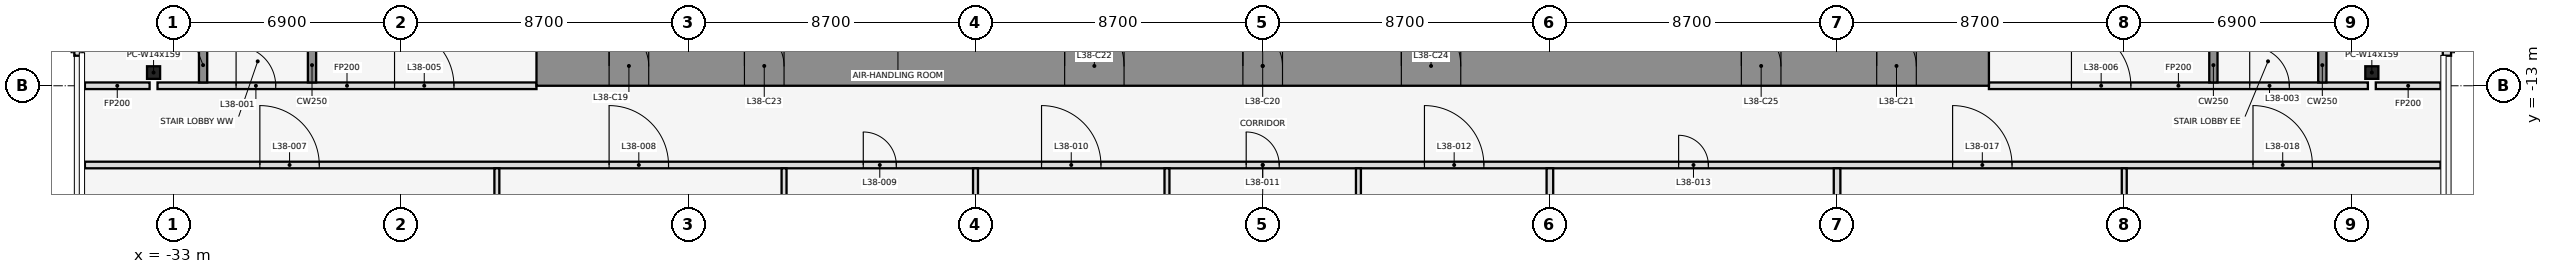
"""IFC4 building model, lengths in metres.
Left out: names, types, materials, properties, quantities, classifications, styles, units other than length and angle.
Written with IfcOpenShell. Run it as: python <this file> out.ifc"""

import sys

from ifc_helpers import new_model, si_unit, direction, frame, frame_2d, origin, origin_2d, place, context, subcontext, project, spatial, rectangle, i_section, extrude, element, fill, save


model = new_model("IFC4")
c1 = context("Model", 3, precision=1e-05, world=origin(), true_north=direction((0.0, 1.0)))
c2 = subcontext(c1, "Body", "Model", "MODEL_VIEW")
j1 = project(units=[si_unit("LENGTHUNIT", "METRE"), si_unit("PLANEANGLEUNIT", "RADIAN")], contexts=[c1])
p1 = place(None, origin())
s1 = spatial("IfcSite", under=j1, at=p1, CompositionType="ELEMENT")
p2 = place(p1, origin())
s2 = spatial("IfcBuilding", under=s1, at=p2, CompositionType="ELEMENT")
p3 = place(p2, frame((0.0, 0.0, 173.2)))
s3 = spatial("IfcBuildingStorey", under=s2, at=p3, CompositionType="ELEMENT", Elevation=173.2)
for number, where, z_axis, x_axis in (
    (1, (-33.6, -12.6, 0.0), (0.0, 0.0, 1.0), (1.0, 0.0, 0.0)),
    (2, (33.6, -12.6, 0.0), (0.0, 0.0, 1.0), (1.0, 0.0, 0.0)),
):
    element("IfcColumn", number, at=place(p3, frame(where, z_axis=z_axis, x_axis=x_axis)), inside=s3, PredefinedType="COLUMN", context=c2, shape_type="SweptSolid", body=[
        extrude(i_section(OverallWidth=0.396, OverallDepth=0.381, WebThickness=0.019, FlangeThickness=0.03, at=origin_2d()), origin(), (0.0, 0.0, 1.0), 4.1),
    ])
for number, where, z_axis, x_axis in (
    (3, (-35.875, -3.0, 0.0), (0.0, 0.0, 1.0), (0.0, -1.0, 0.0)),
    (4, (35.875, -12.09, 0.0), (0.0, 0.0, 1.0), (0.0, 1.0, 0.0)),
):
    element("IfcWall", number, at=place(p3, frame(where, z_axis=z_axis, x_axis=x_axis)), inside=s3, PredefinedType="STANDARD", context=c2, shape_type="SweptSolid", body=[
        extrude(rectangle(XDim=9.09, YDim=0.25, at=frame_2d((4.545, 0.0))), origin(), (0.0, 0.0, 1.0), 3.95),
    ])
p4 = place(p3, frame((-35.68, -15.4, 0.0), z_axis=(0.0, 0.0, 1.0), x_axis=(1.0, 0.0, 0.0)))
e5 = element("IfcWall", 5, at=p4, inside=s3, PredefinedType="PARTITIONING", context=c2, shape_type="SweptSolid", body=[
    extrude(rectangle(XDim=71.36, YDim=0.2, at=frame_2d((35.68, 0.0))), origin(), (0.0, 0.0, 1.0), 2.84),
])
p5 = place(p4, frame((5.3, 0.0, 0.0)))
e6 = element("IfcOpeningElement", 6, at=p5, cuts=e5, PredefinedType="OPENING", context=c2, shape_type="SweptSolid", body=[
    extrude(rectangle(XDim=1.8, YDim=2.1, at=frame_2d((0.9, 1.05))), frame((0.0, 0.112, 0.0), z_axis=(0.0, -1.0, 0.0), x_axis=(1.0, 0.0, 0.0)), (0.0, 0.0, 1.0), 0.224),
])
p6 = place(p4, frame((15.88, 0.0, 0.0)))
e7 = element("IfcOpeningElement", 7, at=p6, cuts=e5, PredefinedType="OPENING", context=c2, shape_type="SweptSolid", body=[
    extrude(rectangle(XDim=1.8, YDim=2.1, at=frame_2d((0.9, 1.05))), frame((0.0, 0.112, 0.0), z_axis=(0.0, -1.0, 0.0), x_axis=(1.0, 0.0, 0.0)), (0.0, 0.0, 1.0), 0.224),
])
p7 = place(p4, frame((23.58, 0.0, 0.0)))
e8 = element("IfcOpeningElement", 8, at=p7, cuts=e5, PredefinedType="OPENING", context=c2, shape_type="SweptSolid", body=[
    extrude(rectangle(XDim=1.0, YDim=2.1, at=frame_2d((0.5, 1.05))), frame((0.0, 0.112, 0.0), z_axis=(0.0, -1.0, 0.0), x_axis=(1.0, 0.0, 0.0)), (0.0, 0.0, 1.0), 0.224),
])
p8 = place(p4, frame((28.98, 0.0, 0.0)))
e9 = element("IfcOpeningElement", 9, at=p8, cuts=e5, PredefinedType="OPENING", context=c2, shape_type="SweptSolid", body=[
    extrude(rectangle(XDim=1.8, YDim=2.1, at=frame_2d((0.9, 1.05))), frame((0.0, 0.112, 0.0), z_axis=(0.0, -1.0, 0.0), x_axis=(1.0, 0.0, 0.0)), (0.0, 0.0, 1.0), 0.224),
])
p9 = place(p4, frame((35.18, 0.0, 0.0)))
e10 = element("IfcOpeningElement", 10, at=p9, cuts=e5, PredefinedType="OPENING", context=c2, shape_type="SweptSolid", body=[
    extrude(rectangle(XDim=1.0, YDim=2.1, at=frame_2d((0.5, 1.05))), frame((0.0, 0.112, 0.0), z_axis=(0.0, -1.0, 0.0), x_axis=(1.0, 0.0, 0.0)), (0.0, 0.0, 1.0), 0.224),
])
p10 = place(p4, frame((40.58, 0.0, 0.0)))
e11 = element("IfcOpeningElement", 11, at=p10, cuts=e5, PredefinedType="OPENING", context=c2, shape_type="SweptSolid", body=[
    extrude(rectangle(XDim=1.8, YDim=2.1, at=frame_2d((0.9, 1.05))), frame((0.0, 0.112, 0.0), z_axis=(0.0, -1.0, 0.0), x_axis=(1.0, 0.0, 0.0)), (0.0, 0.0, 1.0), 0.224),
])
p11 = place(p4, frame((48.28, 0.0, 0.0)))
e12 = element("IfcOpeningElement", 12, at=p11, cuts=e5, PredefinedType="OPENING", context=c2, shape_type="SweptSolid", body=[
    extrude(rectangle(XDim=0.9, YDim=2.1, at=frame_2d((0.45, 1.05))), frame((0.0, 0.112, 0.0), z_axis=(0.0, -1.0, 0.0), x_axis=(1.0, 0.0, 0.0)), (0.0, 0.0, 1.0), 0.224),
])
p12 = place(p4, frame((56.58, 0.0, 0.0)))
e13 = element("IfcOpeningElement", 13, at=p12, cuts=e5, PredefinedType="OPENING", context=c2, shape_type="SweptSolid", body=[
    extrude(rectangle(XDim=1.8, YDim=2.1, at=frame_2d((0.9, 1.05))), frame((0.0, 0.112, 0.0), z_axis=(0.0, -1.0, 0.0), x_axis=(1.0, 0.0, 0.0)), (0.0, 0.0, 1.0), 0.224),
])
p13 = place(p4, frame((65.68, 0.0, 0.0)))
e14 = element("IfcOpeningElement", 14, at=p13, cuts=e5, PredefinedType="OPENING", context=c2, shape_type="SweptSolid", body=[
    extrude(rectangle(XDim=1.8, YDim=2.1, at=frame_2d((0.9, 1.05))), frame((0.0, 0.112, 0.0), z_axis=(0.0, -1.0, 0.0), x_axis=(1.0, 0.0, 0.0)), (0.0, 0.0, 1.0), 0.224),
])
p14 = place(p3, frame((-35.68, -13.0, 0.0), z_axis=(0.0, 0.0, 1.0), x_axis=(1.0, 0.0, 0.0)))
e15 = element("IfcWall", 15, at=p14, inside=s3, PredefinedType="PARTITIONING", context=c2, shape_type="SweptSolid", body=[
    extrude(rectangle(XDim=1.96, YDim=0.2, at=frame_2d((0.98, 0.0))), origin(), (0.0, 0.0, 1.0), 2.84),
])
p15 = place(p3, frame((-33.48, -13.0, 0.0), z_axis=(0.0, 0.0, 1.0), x_axis=(1.0, 0.0, 0.0)))
e16 = element("IfcWall", 16, at=p15, inside=s3, PredefinedType="PARTITIONING", context=c2, shape_type="SweptSolid", body=[
    extrude(rectangle(XDim=11.48, YDim=0.2, at=frame_2d((5.74, 0.0))), origin(), (0.0, 0.0, 1.0), 2.84),
])
p16 = place(p15, frame((2.38, 0.0, 0.0)))
e17 = element("IfcOpeningElement", 17, at=p16, cuts=e16, PredefinedType="OPENING", context=c2, shape_type="SweptSolid", body=[
    extrude(rectangle(XDim=1.2, YDim=2.1, at=frame_2d((0.6, 1.05))), frame((0.0, 0.112, 0.0), z_axis=(0.0, -1.0, 0.0), x_axis=(1.0, 0.0, 0.0)), (0.0, 0.0, 1.0), 0.224),
])
p17 = place(p15, frame((7.18, 0.0, 0.0)))
e18 = element("IfcOpeningElement", 18, at=p17, cuts=e16, PredefinedType="OPENING", context=c2, shape_type="SweptSolid", body=[
    extrude(rectangle(XDim=1.8, YDim=2.1, at=frame_2d((0.9, 1.05))), frame((0.0, 0.112, 0.0), z_axis=(0.0, -1.0, 0.0), x_axis=(1.0, 0.0, 0.0)), (0.0, 0.0, 1.0), 0.224),
])
p18 = place(p3, frame((22.0, -13.0, 0.0), z_axis=(0.0, 0.0, 1.0), x_axis=(1.0, 0.0, 0.0)))
e19 = element("IfcWall", 19, at=p18, inside=s3, PredefinedType="PARTITIONING", context=c2, shape_type="SweptSolid", body=[
    extrude(rectangle(XDim=11.48, YDim=0.2, at=frame_2d((5.74, 0.0))), origin(), (0.0, 0.0, 1.0), 2.84),
])
p19 = place(p18, frame((7.9, 0.0, 0.0)))
e20 = element("IfcOpeningElement", 20, at=p19, cuts=e19, PredefinedType="OPENING", context=c2, shape_type="SweptSolid", body=[
    extrude(rectangle(XDim=1.2, YDim=2.1, at=frame_2d((0.6, 1.05))), frame((0.0, 0.112, 0.0), z_axis=(0.0, -1.0, 0.0), x_axis=(1.0, 0.0, 0.0)), (0.0, 0.0, 1.0), 0.224),
])
p20 = place(p18, frame((2.5, 0.0, 0.0)))
e21 = element("IfcOpeningElement", 21, at=p20, cuts=e19, PredefinedType="OPENING", context=c2, shape_type="SweptSolid", body=[
    extrude(rectangle(XDim=1.8, YDim=2.1, at=frame_2d((0.9, 1.05))), frame((0.0, 0.112, 0.0), z_axis=(0.0, -1.0, 0.0), x_axis=(1.0, 0.0, 0.0)), (0.0, 0.0, 1.0), 0.224),
])
p21 = place(p3, frame((33.72, -13.0, 0.0), z_axis=(0.0, 0.0, 1.0), x_axis=(1.0, 0.0, 0.0)))
e22 = element("IfcWall", 22, at=p21, inside=s3, PredefinedType="PARTITIONING", context=c2, shape_type="SweptSolid", body=[
    extrude(rectangle(XDim=1.96, YDim=0.2, at=frame_2d((0.98, 0.0))), origin(), (0.0, 0.0, 1.0), 2.84),
])
for number, where, z_axis, x_axis in (
    (23, (-32.1, -12.9, 0.0), (0.0, 0.0, 1.0), (0.0, 1.0, 0.0)),
    (24, (-28.8, -12.9, 0.0), (0.0, 0.0, 1.0), (0.0, 1.0, 0.0)),
):
    element("IfcWall", number, at=place(p3, frame(where, z_axis=z_axis, x_axis=x_axis)), inside=s3, PredefinedType="SHEAR", context=c2, shape_type="SweptSolid", body=[
        extrude(rectangle(XDim=1.05, YDim=0.25, at=frame_2d((0.525, 0.0))), origin(), (0.0, 0.0, 1.0), 4.1),
    ])
p22 = place(p3, frame((-23.2, -33.98, 0.0), z_axis=(0.0, 0.0, 1.0), x_axis=(0.0, 1.0, 0.0)))
e25 = element("IfcWall", 25, at=p22, inside=s3, PredefinedType="PARTITIONING", context=c2, shape_type="SweptSolid", body=[
    extrude(rectangle(XDim=18.48, YDim=0.15, at=frame_2d((9.24, 0.0))), origin(), (0.0, 0.0, 1.0), 2.84),
])
p23 = place(p3, frame((-14.5, -32.464, 0.0), z_axis=(0.0, 0.0, 1.0), x_axis=(0.0, 1.0, 0.0)))
e26 = element("IfcWall", 26, at=p23, inside=s3, PredefinedType="PARTITIONING", context=c2, shape_type="SweptSolid", body=[
    extrude(rectangle(XDim=16.964, YDim=0.15, at=frame_2d((8.482, 0.0))), origin(), (0.0, 0.0, 1.0), 2.84),
])
p24 = place(p3, frame((-8.7, -34.302, 0.0), z_axis=(0.0, 0.0, 1.0), x_axis=(0.0, 1.0, 0.0)))
e27 = element("IfcWall", 27, at=p24, inside=s3, PredefinedType="PARTITIONING", context=c2, shape_type="SweptSolid", body=[
    extrude(rectangle(XDim=18.802, YDim=0.15, at=frame_2d((9.401, 0.0))), origin(), (0.0, 0.0, 1.0), 2.84),
])
for number, where, z_axis, x_axis in (
    (28, (-2.9, -35.66, 0.0), (0.0, 0.0, 1.0), (0.0, 1.0, 0.0)),
    (29, (2.9, -35.66, 0.0), (0.0, 0.0, 1.0), (0.0, 1.0, 0.0)),
):
    element("IfcWall", number, at=place(p3, frame(where, z_axis=z_axis, x_axis=x_axis)), inside=s3, PredefinedType="PARTITIONING", context=c2, shape_type="SweptSolid", body=[
        extrude(rectangle(XDim=20.16, YDim=0.15, at=frame_2d((10.08, 0.0))), origin(), (0.0, 0.0, 1.0), 2.84),
    ])
p25 = place(p3, frame((8.7, -34.302, 0.0), z_axis=(0.0, 0.0, 1.0), x_axis=(0.0, 1.0, 0.0)))
e30 = element("IfcWall", 30, at=p25, inside=s3, PredefinedType="PARTITIONING", context=c2, shape_type="SweptSolid", body=[
    extrude(rectangle(XDim=18.802, YDim=0.2, at=frame_2d((9.401, 0.0))), origin(), (0.0, 0.0, 1.0), 2.84),
])
p26 = place(p3, frame((17.4, -21.725, 0.0), z_axis=(0.0, 0.0, 1.0), x_axis=(0.0, 1.0, 0.0)))
e31 = element("IfcWall", 31, at=p26, inside=s3, PredefinedType="PARTITIONING", context=c2, shape_type="SweptSolid", body=[
    extrude(rectangle(XDim=6.225, YDim=0.2, at=frame_2d((3.113, 0.0))), origin(), (0.0, 0.0, 1.0), 2.84),
])
p27 = place(p3, frame((26.1, -33.98, 0.0), z_axis=(0.0, 0.0, 1.0), x_axis=(0.0, 1.0, 0.0)))
e32 = element("IfcWall", 32, at=p27, inside=s3, PredefinedType="PARTITIONING", context=c2, shape_type="SweptSolid", body=[
    extrude(rectangle(XDim=18.48, YDim=0.15, at=frame_2d((9.24, 0.0))), origin(), (0.0, 0.0, 1.0), 2.84),
])
for number, where, z_axis, x_axis in (
    (33, (28.8, -12.9, 0.0), (0.0, 0.0, 1.0), (0.0, 1.0, 0.0)),
    (34, (32.1, -12.9, 0.0), (0.0, 0.0, 1.0), (0.0, 1.0, 0.0)),
):
    element("IfcWall", number, at=place(p3, frame(where, z_axis=z_axis, x_axis=x_axis)), inside=s3, PredefinedType="SHEAR", context=c2, shape_type="SweptSolid", body=[
        extrude(rectangle(XDim=1.05, YDim=0.25, at=frame_2d((0.525, 0.0))), origin(), (0.0, 0.0, 1.0), 4.1),
    ])
p28 = place(p3, frame((-22.0, -12.4, 0.0), z_axis=(0.0, 0.0, 1.0), x_axis=(1.0, 0.0, 0.0)))
e35 = element("IfcWall", 35, at=p28, inside=s3, PredefinedType="SHEAR", context=c2, shape_type="SweptSolid", body=[
    extrude(rectangle(XDim=44.0, YDim=1.2, at=frame_2d((22.0, 0.0))), origin(), (0.0, 0.0, 1.0), 4.1),
])
p29 = place(p28, frame((2.2, 0.0, 0.0)))
e36 = element("IfcOpeningElement", 36, at=p29, cuts=e35, PredefinedType="OPENING", context=c2, shape_type="SweptSolid", body=[
    extrude(rectangle(XDim=1.2, YDim=2.1, at=frame_2d((0.6, 1.05))), frame((0.0, 0.612, 0.0), z_axis=(0.0, -1.0, 0.0), x_axis=(1.0, 0.0, 0.0)), (0.0, 0.0, 1.0), 1.224),
])
p30 = place(p28, frame((21.4, 0.0, 0.0)))
e37 = element("IfcOpeningElement", 37, at=p30, cuts=e35, PredefinedType="OPENING", context=c2, shape_type="SweptSolid", body=[
    extrude(rectangle(XDim=1.2, YDim=2.1, at=frame_2d((0.6, 1.05))), frame((0.0, 0.612, 0.0), z_axis=(0.0, -1.0, 0.0), x_axis=(1.0, 0.0, 0.0)), (0.0, 0.0, 1.0), 1.224),
])
p31 = place(p28, frame((40.6, 0.0, 0.0)))
e38 = element("IfcOpeningElement", 38, at=p31, cuts=e35, PredefinedType="OPENING", context=c2, shape_type="SweptSolid", body=[
    extrude(rectangle(XDim=1.2, YDim=2.1, at=frame_2d((0.6, 1.05))), frame((0.0, 0.612, 0.0), z_axis=(0.0, -1.0, 0.0), x_axis=(1.0, 0.0, 0.0)), (0.0, 0.0, 1.0), 1.224),
])
p32 = place(p28, frame((16.0, 0.0, 0.0)))
e39 = element("IfcOpeningElement", 39, at=p32, cuts=e35, PredefinedType="OPENING", context=c2, shape_type="SweptSolid", body=[
    extrude(rectangle(XDim=1.8, YDim=2.1, at=frame_2d((0.9, 1.05))), frame((0.0, 0.612, 0.0), z_axis=(0.0, -1.0, 0.0), x_axis=(1.0, 0.0, 0.0)), (0.0, 0.0, 1.0), 1.224),
])
p33 = place(p28, frame((6.3, 0.0, 0.0)))
e40 = element("IfcOpeningElement", 40, at=p33, cuts=e35, PredefinedType="OPENING", context=c2, shape_type="SweptSolid", body=[
    extrude(rectangle(XDim=1.2, YDim=2.1, at=frame_2d((0.6, 1.05))), frame((0.0, 0.612, 0.0), z_axis=(0.0, -1.0, 0.0), x_axis=(1.0, 0.0, 0.0)), (0.0, 0.0, 1.0), 1.224),
])
p34 = place(p28, frame((26.2, 0.0, 0.0)))
e41 = element("IfcOpeningElement", 41, at=p34, cuts=e35, PredefinedType="OPENING", context=c2, shape_type="SweptSolid", body=[
    extrude(rectangle(XDim=1.8, YDim=2.1, at=frame_2d((0.9, 1.05))), frame((0.0, 0.612, 0.0), z_axis=(0.0, -1.0, 0.0), x_axis=(1.0, 0.0, 0.0)), (0.0, 0.0, 1.0), 1.224),
])
p35 = place(p28, frame((36.5, 0.0, 0.0)))
e42 = element("IfcOpeningElement", 42, at=p35, cuts=e35, PredefinedType="OPENING", context=c2, shape_type="SweptSolid", body=[
    extrude(rectangle(XDim=1.2, YDim=2.1, at=frame_2d((0.6, 1.05))), frame((0.0, 0.612, 0.0), z_axis=(0.0, -1.0, 0.0), x_axis=(1.0, 0.0, 0.0)), (0.0, 0.0, 1.0), 1.224),
])
p36 = place(p16, origin())
e43 = element("IfcDoor", 43, at=p36, inside=s3, OperationType="SINGLE_SWING_LEFT", PredefinedType="DOOR", context=c2, shape_type="SweptSolid", body=[
    extrude(rectangle(XDim=1.2, YDim=2.1, at=frame_2d((0.6, 1.05))), frame((0.0, 0.025, 0.0), z_axis=(0.0, -1.0, 0.0), x_axis=(1.0, 0.0, 0.0)), (0.0, 0.0, 1.0), 0.05),
])
fill(e17, e43)
p37 = place(p19, origin())
e44 = element("IfcDoor", 44, at=p37, inside=s3, OperationType="SINGLE_SWING_RIGHT", PredefinedType="DOOR", context=c2, shape_type="SweptSolid", body=[
    extrude(rectangle(XDim=1.2, YDim=2.1, at=frame_2d((0.6, 1.05))), frame((0.0, 0.025, 0.0), z_axis=(0.0, -1.0, 0.0), x_axis=(1.0, 0.0, 0.0)), (0.0, 0.0, 1.0), 0.05),
])
fill(e20, e44)
p38 = place(p17, origin())
e45 = element("IfcDoor", 45, at=p38, inside=s3, OperationType="SINGLE_SWING_LEFT", PredefinedType="DOOR", context=c2, shape_type="SweptSolid", body=[
    extrude(rectangle(XDim=1.8, YDim=2.1, at=frame_2d((0.9, 1.05))), frame((0.0, 0.025, 0.0), z_axis=(0.0, -1.0, 0.0), x_axis=(1.0, 0.0, 0.0)), (0.0, 0.0, 1.0), 0.05),
])
fill(e18, e45)
p39 = place(p20, origin())
e46 = element("IfcDoor", 46, at=p39, inside=s3, OperationType="SINGLE_SWING_LEFT", PredefinedType="DOOR", context=c2, shape_type="SweptSolid", body=[
    extrude(rectangle(XDim=1.8, YDim=2.1, at=frame_2d((0.9, 1.05))), frame((0.0, 0.025, 0.0), z_axis=(0.0, -1.0, 0.0), x_axis=(1.0, 0.0, 0.0)), (0.0, 0.0, 1.0), 0.05),
])
fill(e21, e46)
p40 = place(p5, origin())
e47 = element("IfcDoor", 47, at=p40, inside=s3, OperationType="SINGLE_SWING_LEFT", PredefinedType="DOOR", context=c2, shape_type="SweptSolid", body=[
    extrude(rectangle(XDim=1.8, YDim=2.1, at=frame_2d((0.9, 1.05))), frame((0.0, 0.025, 0.0), z_axis=(0.0, -1.0, 0.0), x_axis=(1.0, 0.0, 0.0)), (0.0, 0.0, 1.0), 0.05),
])
fill(e6, e47)
p41 = place(p6, origin())
e48 = element("IfcDoor", 48, at=p41, inside=s3, OperationType="SINGLE_SWING_LEFT", PredefinedType="DOOR", context=c2, shape_type="SweptSolid", body=[
    extrude(rectangle(XDim=1.8, YDim=2.1, at=frame_2d((0.9, 1.05))), frame((0.0, 0.025, 0.0), z_axis=(0.0, -1.0, 0.0), x_axis=(1.0, 0.0, 0.0)), (0.0, 0.0, 1.0), 0.05),
])
fill(e7, e48)
p42 = place(p7, frame((1.0, 0.0, 0.0), z_axis=(0.0, 0.0, 1.0), x_axis=(-1.0, 0.0, 0.0)))
e49 = element("IfcDoor", 49, at=p42, inside=s3, OperationType="SINGLE_SWING_RIGHT", PredefinedType="DOOR", context=c2, shape_type="SweptSolid", body=[
    extrude(rectangle(XDim=1.0, YDim=2.1, at=frame_2d((0.5, 1.05))), frame((0.0, 0.025, 0.0), z_axis=(0.0, -1.0, 0.0), x_axis=(1.0, 0.0, 0.0)), (0.0, 0.0, 1.0), 0.05),
])
fill(e8, e49)
p43 = place(p8, origin())
e50 = element("IfcDoor", 50, at=p43, inside=s3, OperationType="SINGLE_SWING_LEFT", PredefinedType="DOOR", context=c2, shape_type="SweptSolid", body=[
    extrude(rectangle(XDim=1.8, YDim=2.1, at=frame_2d((0.9, 1.05))), frame((0.0, 0.025, 0.0), z_axis=(0.0, -1.0, 0.0), x_axis=(1.0, 0.0, 0.0)), (0.0, 0.0, 1.0), 0.05),
])
fill(e9, e50)
p44 = place(p9, frame((1.0, 0.0, 0.0), z_axis=(0.0, 0.0, 1.0), x_axis=(-1.0, 0.0, 0.0)))
e51 = element("IfcDoor", 51, at=p44, inside=s3, OperationType="SINGLE_SWING_RIGHT", PredefinedType="DOOR", context=c2, shape_type="SweptSolid", body=[
    extrude(rectangle(XDim=1.0, YDim=2.1, at=frame_2d((0.5, 1.05))), frame((0.0, 0.025, 0.0), z_axis=(0.0, -1.0, 0.0), x_axis=(1.0, 0.0, 0.0)), (0.0, 0.0, 1.0), 0.05),
])
fill(e10, e51)
p45 = place(p10, origin())
e52 = element("IfcDoor", 52, at=p45, inside=s3, OperationType="SINGLE_SWING_LEFT", PredefinedType="DOOR", context=c2, shape_type="SweptSolid", body=[
    extrude(rectangle(XDim=1.8, YDim=2.1, at=frame_2d((0.9, 1.05))), frame((0.0, 0.025, 0.0), z_axis=(0.0, -1.0, 0.0), x_axis=(1.0, 0.0, 0.0)), (0.0, 0.0, 1.0), 0.05),
])
fill(e11, e52)
p46 = place(p11, frame((0.9, 0.0, 0.0), z_axis=(0.0, 0.0, 1.0), x_axis=(-1.0, 0.0, 0.0)))
e53 = element("IfcDoor", 53, at=p46, inside=s3, OperationType="SINGLE_SWING_LEFT", PredefinedType="DOOR", context=c2, shape_type="SweptSolid", body=[
    extrude(rectangle(XDim=0.9, YDim=2.1, at=frame_2d((0.45, 1.05))), frame((0.0, 0.025, 0.0), z_axis=(0.0, -1.0, 0.0), x_axis=(1.0, 0.0, 0.0)), (0.0, 0.0, 1.0), 0.05),
])
fill(e12, e53)
p47 = place(p12, origin())
e54 = element("IfcDoor", 54, at=p47, inside=s3, OperationType="SINGLE_SWING_LEFT", PredefinedType="DOOR", context=c2, shape_type="SweptSolid", body=[
    extrude(rectangle(XDim=1.8, YDim=2.1, at=frame_2d((0.9, 1.05))), frame((0.0, 0.025, 0.0), z_axis=(0.0, -1.0, 0.0), x_axis=(1.0, 0.0, 0.0)), (0.0, 0.0, 1.0), 0.05),
])
fill(e13, e54)
p48 = place(p13, origin())
e55 = element("IfcDoor", 55, at=p48, inside=s3, OperationType="SINGLE_SWING_LEFT", PredefinedType="DOOR", context=c2, shape_type="SweptSolid", body=[
    extrude(rectangle(XDim=1.8, YDim=2.1, at=frame_2d((0.9, 1.05))), frame((0.0, 0.025, 0.0), z_axis=(0.0, -1.0, 0.0), x_axis=(1.0, 0.0, 0.0)), (0.0, 0.0, 1.0), 0.05),
])
fill(e14, e55)
p49 = place(p29, frame((1.2, 0.0, 0.0), z_axis=(0.0, 0.0, 1.0), x_axis=(-1.0, 0.0, 0.0)))
e56 = element("IfcDoor", 56, at=p49, inside=s3, OperationType="SINGLE_SWING_RIGHT", PredefinedType="DOOR", context=c2, shape_type="SweptSolid", body=[
    extrude(rectangle(XDim=1.2, YDim=2.1, at=frame_2d((0.6, 1.05))), frame((0.0, 0.025, 0.0), z_axis=(0.0, -1.0, 0.0), x_axis=(1.0, 0.0, 0.0)), (0.0, 0.0, 1.0), 0.05),
])
fill(e36, e56)
p50 = place(p30, frame((1.2, 0.0, 0.0), z_axis=(0.0, 0.0, 1.0), x_axis=(-1.0, 0.0, 0.0)))
e57 = element("IfcDoor", 57, at=p50, inside=s3, OperationType="SINGLE_SWING_RIGHT", PredefinedType="DOOR", context=c2, shape_type="SweptSolid", body=[
    extrude(rectangle(XDim=1.2, YDim=2.1, at=frame_2d((0.6, 1.05))), frame((0.0, 0.025, 0.0), z_axis=(0.0, -1.0, 0.0), x_axis=(1.0, 0.0, 0.0)), (0.0, 0.0, 1.0), 0.05),
])
fill(e37, e57)
p51 = place(p31, frame((1.2, 0.0, 0.0), z_axis=(0.0, 0.0, 1.0), x_axis=(-1.0, 0.0, 0.0)))
e58 = element("IfcDoor", 58, at=p51, inside=s3, OperationType="SINGLE_SWING_RIGHT", PredefinedType="DOOR", context=c2, shape_type="SweptSolid", body=[
    extrude(rectangle(XDim=1.2, YDim=2.1, at=frame_2d((0.6, 1.05))), frame((0.0, 0.025, 0.0), z_axis=(0.0, -1.0, 0.0), x_axis=(1.0, 0.0, 0.0)), (0.0, 0.0, 1.0), 0.05),
])
fill(e38, e58)
p52 = place(p32, origin())
e59 = element("IfcDoor", 59, at=p52, inside=s3, OperationType="SINGLE_SWING_LEFT", PredefinedType="DOOR", context=c2, shape_type="SweptSolid", body=[
    extrude(rectangle(XDim=1.8, YDim=2.1, at=frame_2d((0.9, 1.05))), frame((0.0, 0.025, 0.0), z_axis=(0.0, -1.0, 0.0), x_axis=(1.0, 0.0, 0.0)), (0.0, 0.0, 1.0), 0.05),
])
fill(e39, e59)
p53 = place(p33, frame((1.2, 0.0, 0.0), z_axis=(0.0, 0.0, 1.0), x_axis=(-1.0, 0.0, 0.0)))
e60 = element("IfcDoor", 60, at=p53, inside=s3, OperationType="SINGLE_SWING_RIGHT", PredefinedType="DOOR", context=c2, shape_type="SweptSolid", body=[
    extrude(rectangle(XDim=1.2, YDim=2.1, at=frame_2d((0.6, 1.05))), frame((0.0, 0.025, 0.0), z_axis=(0.0, -1.0, 0.0), x_axis=(1.0, 0.0, 0.0)), (0.0, 0.0, 1.0), 0.05),
])
fill(e40, e60)
p54 = place(p34, origin())
e61 = element("IfcDoor", 61, at=p54, inside=s3, OperationType="SINGLE_SWING_LEFT", PredefinedType="DOOR", context=c2, shape_type="SweptSolid", body=[
    extrude(rectangle(XDim=1.8, YDim=2.1, at=frame_2d((0.9, 1.05))), frame((0.0, 0.025, 0.0), z_axis=(0.0, -1.0, 0.0), x_axis=(1.0, 0.0, 0.0)), (0.0, 0.0, 1.0), 0.05),
])
fill(e41, e61)
p55 = place(p35, frame((1.2, 0.0, 0.0), z_axis=(0.0, 0.0, 1.0), x_axis=(-1.0, 0.0, 0.0)))
e62 = element("IfcDoor", 62, at=p55, inside=s3, OperationType="SINGLE_SWING_RIGHT", PredefinedType="DOOR", context=c2, shape_type="SweptSolid", body=[
    extrude(rectangle(XDim=1.2, YDim=2.1, at=frame_2d((0.6, 1.05))), frame((0.0, 0.025, 0.0), z_axis=(0.0, -1.0, 0.0), x_axis=(1.0, 0.0, 0.0)), (0.0, 0.0, 1.0), 0.05),
])
fill(e42, e62)
save(model, sys.argv[1])
